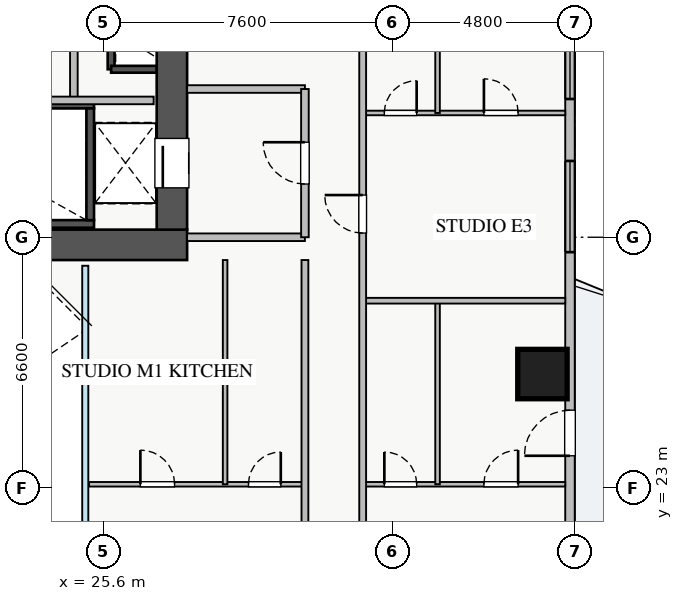
"""IFC4 building model, lengths in metres.
Left out: names, types, materials, properties, quantities, classifications, styles, units other than length and angle.
Written with IfcOpenShell. Run it as: python <this file> out.ifc"""

import sys

from ifc_helpers import new_model, si_unit, direction, frame, frame_2d, origin, origin_2d, place, context, subcontext, project, spatial, rectangle, extrude, source, transform, mapped, element, fill, save


model = new_model("IFC4")
c1 = context("Model", 3, precision=1e-05, world=origin(), true_north=direction((0.0, 1.0)))
c2 = subcontext(c1, "Body", "Model", "MODEL_VIEW")
j1 = project(units=[si_unit("LENGTHUNIT", "METRE"), si_unit("PLANEANGLEUNIT", "RADIAN")], contexts=[c1])
p1 = place(None, origin())
s1 = spatial("IfcSite", under=j1, at=p1, CompositionType="ELEMENT")
p2 = place(p1, origin())
s2 = spatial("IfcBuilding", under=s1, at=p2, CompositionType="ELEMENT")
p3 = place(p2, frame((0.0, 0.0, 32.75)))
s3 = spatial("IfcBuildingStorey", under=s2, at=p3, CompositionType="ELEMENT", Elevation=32.75)
p4 = place(p3, frame((25.8, 34.02, 0.0), z_axis=(0.0, 0.0, 1.0), x_axis=(0.0, 1.0, 0.0)))
e1 = element("IfcWall", 1, at=p4, inside=s3, PredefinedType="SHEAR", context=c2, shape_type="SweptSolid", body=[
    extrude(rectangle(XDim=1.06, YDim=0.18, at=frame_2d((0.53, 0.0))), origin(), (0.0, 0.0, 1.0), 3.07),
])
p5 = place(p3, frame((25.8, 34.02, 0.0), z_axis=(0.0, 0.0, 1.0), x_axis=(1.0, 0.0, 0.0)))
e2 = element("IfcWall", 2, at=p5, inside=s3, PredefinedType="SHEAR", context=c2, shape_type="SweptSolid", body=[
    extrude(rectangle(XDim=1.2, YDim=0.18, at=frame_2d((0.6, 0.0))), origin(), (0.0, 0.0, 1.0), 3.07),
])
p6 = place(p3, frame((18.2, 29.95, 0.0), z_axis=(0.0, 0.0, 1.0), x_axis=(1.0, 0.0, 0.0)))
e3 = element("IfcWall", 3, at=p6, inside=s3, PredefinedType="SHEAR", context=c2, shape_type="SweptSolid", body=[
    extrude(rectangle(XDim=7.15, YDim=0.2, at=frame_2d((3.575, 0.0))), origin(), (0.0, 0.0, 1.0), 3.25),
])
p7 = place(p3, frame((18.2, 33.09, 0.0), z_axis=(0.0, 0.0, 1.0), x_axis=(1.0, 0.0, 0.0)))
e4 = element("IfcWall", 4, at=p7, inside=s3, PredefinedType="SHEAR", context=c2, shape_type="SweptSolid", body=[
    extrude(rectangle(XDim=7.15, YDim=0.2, at=frame_2d((3.575, 0.0))), origin(), (0.0, 0.0, 1.0), 3.25),
])
p8 = place(p7, frame((0.35, 0.0, 0.0)))
e5 = element("IfcOpeningElement", 5, at=p8, cuts=e4, PredefinedType="OPENING", context=c2, shape_type="SweptSolid", body=[
    extrude(rectangle(XDim=1.1, YDim=2.05, at=frame_2d((0.55, 1.025))), frame((0.0, 0.11, 0.0), z_axis=(0.0, -1.0, 0.0), x_axis=(1.0, 0.0, 0.0)), (0.0, 0.0, 1.0), 0.22),
])
p9 = place(p3, frame((25.25, 30.05, 0.0), z_axis=(0.0, 0.0, 1.0), x_axis=(0.0, 1.0, 0.0)))
e6 = element("IfcWall", 6, at=p9, inside=s3, PredefinedType="SHEAR", context=c2, shape_type="SweptSolid", body=[
    extrude(rectangle(XDim=2.94, YDim=0.2, at=frame_2d((1.47, 0.0))), origin(), (0.0, 0.0, 1.0), 3.25),
])
p10 = place(p3, frame((10.2, 29.4, 0.0), z_axis=(0.0, 0.0, 1.0), x_axis=(1.0, 0.0, 0.0)))
e7 = element("IfcWall", 7, at=p10, inside=s3, PredefinedType="SHEAR", context=c2, shape_type="SweptSolid", body=[
    extrude(rectangle(XDim=17.6, YDim=0.8, at=frame_2d((8.8, 0.0))), origin(), (0.0, 0.0, 1.0), 3.25),
])
p11 = place(p3, frame((27.4, 29.8, 0.0), z_axis=(0.0, 0.0, 1.0), x_axis=(0.0, 1.0, 0.0)))
e8 = element("IfcWall", 8, at=p11, inside=s3, PredefinedType="SHEAR", context=c2, shape_type="SweptSolid", body=[
    extrude(rectangle(XDim=5.6, YDim=0.8, at=frame_2d((2.8, 0.0))), origin(), (0.0, 0.0, 1.0), 3.25),
])
p12 = place(p11, frame((1.1, 0.0, 0.0)))
e9 = element("IfcOpeningElement", 9, at=p12, cuts=e8, PredefinedType="OPENING", context=c2, shape_type="SweptSolid", body=[
    extrude(rectangle(XDim=1.3, YDim=2.05, at=frame_2d((0.65, 1.025))), frame((0.0, 0.41, 0.0), z_axis=(0.0, -1.0, 0.0), x_axis=(1.0, 0.0, 0.0)), (0.0, 0.0, 1.0), 0.82),
])
m1 = source(origin(), c2, "Body", "SweptSolid", [
    extrude(rectangle(XDim=1.3, YDim=1.3, at=origin_2d()), origin(), (0.0, 0.0, 1.0), 3.25),
])
p13 = place(p3, frame((37.15, 26.0, 0.0), z_axis=(0.0, 0.0, 1.0), x_axis=(1.0, 0.0, 0.0)))
e10 = element("IfcColumn", 10, at=p13, inside=s3, PredefinedType="COLUMN", context=c2, shape_type="MappedRepresentation", body=[
    mapped(m1, transform((0.0, 0.0, 0.0), x_axis=(1.0, 0.0, 0.0), y_axis=(0.0, 1.0, 0.0), z_axis=(0.0, 0.0, 1.0), scale=1.0)),
])
p14 = place(p3, frame((37.875, 9.45, 0.0), z_axis=(0.0, 0.0, 1.0), x_axis=(0.0, 1.0, 0.0)))
e11 = element("IfcWall", 11, at=p14, inside=s3, PredefinedType="STANDARD", context=c2, shape_type="SweptSolid", body=[
    extrude(rectangle(XDim=27.1, YDim=0.25, at=frame_2d((13.55, 0.0))), origin(), (0.0, 0.0, 1.0), 2.61),
])
p15 = place(p14, frame((14.4, 0.0, 0.0)))
e12 = element("IfcOpeningElement", 12, at=p15, cuts=e11, PredefinedType="OPENING", context=c2, shape_type="SweptSolid", body=[
    extrude(rectangle(XDim=1.2, YDim=2.1, at=frame_2d((0.6, 1.05))), frame((0.0, 0.135, 0.0), z_axis=(0.0, -1.0, 0.0), x_axis=(1.0, 0.0, 0.0)), (0.0, 0.0, 1.0), 0.27),
])
p16 = place(p14, frame((1.552, 0.0, 0.9)))
e13 = element("IfcOpeningElement", 13, at=p16, cuts=e11, PredefinedType="OPENING", context=c2, shape_type="SweptSolid", body=[
    extrude(rectangle(XDim=2.4, YDim=1.5, at=frame_2d((1.2, 0.75))), frame((0.0, 0.135, 0.0), z_axis=(0.0, -1.0, 0.0), x_axis=(1.0, 0.0, 0.0)), (0.0, 0.0, 1.0), 0.27),
])
p17 = place(p14, frame((23.788, 0.0, 0.9)))
e14 = element("IfcOpeningElement", 14, at=p17, cuts=e11, PredefinedType="OPENING", context=c2, shape_type="SweptSolid", body=[
    extrude(rectangle(XDim=1.8, YDim=1.5, at=frame_2d((0.9, 0.75))), frame((0.0, 0.135, 0.0), z_axis=(0.0, -1.0, 0.0), x_axis=(1.0, 0.0, 0.0)), (0.0, 0.0, 1.0), 0.27),
])
p18 = place(p14, frame((19.758, 0.0, 0.9)))
e15 = element("IfcOpeningElement", 15, at=p18, cuts=e11, PredefinedType="OPENING", context=c2, shape_type="SweptSolid", body=[
    extrude(rectangle(XDim=2.4, YDim=1.5, at=frame_2d((1.2, 0.75))), frame((0.0, 0.135, 0.0), z_axis=(0.0, -1.0, 0.0), x_axis=(1.0, 0.0, 0.0)), (0.0, 0.0, 1.0), 0.27),
])
p19 = place(p14, frame((8.755, 0.0, 0.9)))
e16 = element("IfcOpeningElement", 16, at=p19, cuts=e11, PredefinedType="OPENING", context=c2, shape_type="SweptSolid", body=[
    extrude(rectangle(XDim=0.9, YDim=1.2, at=frame_2d((0.45, 0.6))), frame((0.0, 0.135, 0.0), z_axis=(0.0, -1.0, 0.0), x_axis=(1.0, 0.0, 0.0)), (0.0, 0.0, 1.0), 0.27),
])
for number, where, z_axis, x_axis in (
    (17, (27.8, 29.6, 0.0), (0.0, 0.0, 1.0), (1.0, 0.0, 0.0)),
    (18, (27.8, 33.5, 0.0), (0.0, 0.0, 1.0), (1.0, 0.0, 0.0)),
):
    element("IfcWall", number, at=place(p3, frame(where, z_axis=z_axis, x_axis=x_axis)), inside=s3, PredefinedType="PARTITIONING", context=c2, shape_type="SweptSolid", body=[
        extrude(rectangle(XDim=3.1, YDim=0.2, at=frame_2d((1.55, 0.0))), origin(), (0.0, 0.0, 1.0), 3.07),
    ])
p20 = place(p3, frame((30.9, 29.6, 0.0), z_axis=(0.0, 0.0, 1.0), x_axis=(0.0, 1.0, 0.0)))
e19 = element("IfcWall", 19, at=p20, inside=s3, PredefinedType="PARTITIONING", context=c2, shape_type="SweptSolid", body=[
    extrude(rectangle(XDim=3.9, YDim=0.2, at=frame_2d((1.95, 0.0))), origin(), (0.0, 0.0, 1.0), 3.07),
])
p21 = place(p20, frame((1.4, 0.0, 0.0)))
e20 = element("IfcOpeningElement", 20, at=p21, cuts=e19, PredefinedType="OPENING", context=c2, shape_type="SweptSolid", body=[
    extrude(rectangle(XDim=1.1, YDim=2.05, at=frame_2d((0.55, 1.025))), frame((0.0, 0.11, 0.0), z_axis=(0.0, -1.0, 0.0), x_axis=(1.0, 0.0, 0.0)), (0.0, 0.0, 1.0), 0.22),
])
p22 = place(p3, frame((24.82, 33.2, 0.0), z_axis=(0.0, 0.0, 1.0), x_axis=(0.0, 1.0, 0.0)))
e21 = element("IfcWall", 21, at=p22, inside=s3, PredefinedType="PARTITIONING", context=c2, shape_type="SweptSolid", body=[
    extrude(rectangle(XDim=2.65, YDim=0.2, at=frame_2d((1.325, 0.0))), origin(), (0.0, 0.0, 1.0), 3.07),
])
p23 = place(p3, frame((21.75, 33.2, 0.0), z_axis=(0.0, 0.0, 1.0), x_axis=(1.0, 0.0, 0.0)))
e22 = element("IfcWall", 22, at=p23, inside=s3, PredefinedType="PARTITIONING", context=c2, shape_type="SweptSolid", body=[
    extrude(rectangle(XDim=5.17, YDim=0.2, at=frame_2d((2.585, 0.0))), origin(), (0.0, 0.0, 1.0), 3.07),
])
p24 = place(p3, frame((32.42, 23.1, 0.0), z_axis=(0.0, 0.0, 1.0), x_axis=(1.0, 0.0, 0.0)))
e23 = element("IfcWall", 23, at=p24, inside=s3, PredefinedType="PLUMBINGWALL", context=c2, shape_type="SweptSolid", body=[
    extrude(rectangle(XDim=5.33, YDim=0.12, at=frame_2d((2.665, 0.0))), origin(), (0.0, 0.0, 1.0), 3.07),
])
p25 = place(p24, frame((0.57, 0.0, 0.0)))
e24 = element("IfcOpeningElement", 24, at=p25, cuts=e23, PredefinedType="OPENING", context=c2, shape_type="SweptSolid", body=[
    extrude(rectangle(XDim=0.85, YDim=2.05, at=frame_2d((0.425, 1.025))), frame((0.0, 0.07, 0.0), z_axis=(0.0, -1.0, 0.0), x_axis=(1.0, 0.0, 0.0)), (0.0, 0.0, 1.0), 0.14),
])
p26 = place(p24, frame((3.19, 0.0, 0.0)))
e25 = element("IfcOpeningElement", 25, at=p26, cuts=e23, PredefinedType="OPENING", context=c2, shape_type="SweptSolid", body=[
    extrude(rectangle(XDim=0.9, YDim=2.05, at=frame_2d((0.45, 1.025))), frame((0.0, 0.07, 0.0), z_axis=(0.0, -1.0, 0.0), x_axis=(1.0, 0.0, 0.0)), (0.0, 0.0, 1.0), 0.14),
])
p27 = place(p3, frame((34.39, 23.1, 0.0), z_axis=(0.0, 0.0, 1.0), x_axis=(0.0, 1.0, 0.0)))
e26 = element("IfcWall", 26, at=p27, inside=s3, PredefinedType="PLUMBINGWALL", context=c2, shape_type="SweptSolid", body=[
    extrude(rectangle(XDim=4.83, YDim=0.12, at=frame_2d((2.415, 0.0))), origin(), (0.0, 0.0, 1.0), 3.07),
])
p28 = place(p3, frame((32.42, 32.87, 0.0), z_axis=(0.0, 0.0, 1.0), x_axis=(1.0, 0.0, 0.0)))
e27 = element("IfcWall", 27, at=p28, inside=s3, PredefinedType="PLUMBINGWALL", context=c2, shape_type="SweptSolid", body=[
    extrude(rectangle(XDim=5.33, YDim=0.12, at=frame_2d((2.665, 0.0))), origin(), (0.0, 0.0, 1.0), 3.07),
])
p29 = place(p28, frame((0.57, 0.0, 0.0)))
e28 = element("IfcOpeningElement", 28, at=p29, cuts=e27, PredefinedType="OPENING", context=c2, shape_type="SweptSolid", body=[
    extrude(rectangle(XDim=0.85, YDim=2.05, at=frame_2d((0.425, 1.025))), frame((0.0, 0.07, 0.0), z_axis=(0.0, -1.0, 0.0), x_axis=(1.0, 0.0, 0.0)), (0.0, 0.0, 1.0), 0.14),
])
p30 = place(p28, frame((3.19, 0.0, 0.0)))
e29 = element("IfcOpeningElement", 29, at=p30, cuts=e27, PredefinedType="OPENING", context=c2, shape_type="SweptSolid", body=[
    extrude(rectangle(XDim=0.9, YDim=2.05, at=frame_2d((0.45, 1.025))), frame((0.0, 0.07, 0.0), z_axis=(0.0, -1.0, 0.0), x_axis=(1.0, 0.0, 0.0)), (0.0, 0.0, 1.0), 0.14),
])
p31 = place(p3, frame((34.39, 32.87, 0.0), z_axis=(0.0, 0.0, 1.0), x_axis=(0.0, 1.0, 0.0)))
e30 = element("IfcWall", 30, at=p31, inside=s3, PredefinedType="PLUMBINGWALL", context=c2, shape_type="SweptSolid", body=[
    extrude(rectangle(XDim=4.21, YDim=0.12, at=frame_2d((2.105, 0.0))), origin(), (0.0, 0.0, 1.0), 3.07),
])
p32 = place(p3, frame((32.42, 27.93, 0.0), z_axis=(0.0, 0.0, 1.0), x_axis=(1.0, 0.0, 0.0)))
e31 = element("IfcWall", 31, at=p32, inside=s3, PredefinedType="PARTITIONING", context=c2, shape_type="SweptSolid", body=[
    extrude(rectangle(XDim=5.33, YDim=0.15, at=frame_2d((2.665, 0.0))), origin(), (0.0, 0.0, 1.0), 2.865),
])
p33 = place(p3, frame((32.42, 7.21, 0.0), z_axis=(0.0, 0.0, 1.0), x_axis=(0.0, 1.0, 0.0)))
e32 = element("IfcWall", 32, at=p33, inside=s3, PredefinedType="PARTITIONING", context=c2, shape_type="SweptSolid", body=[
    extrude(rectangle(XDim=31.23, YDim=0.18, at=frame_2d((15.615, 0.0))), origin(), (0.0, 0.0, 1.0), 2.771),
])
p34 = place(p33, frame((30.09, 0.0, 0.0)))
e33 = element("IfcOpeningElement", 33, at=p34, cuts=e32, PredefinedType="OPENING", context=c2, shape_type="SweptSolid", body=[
    extrude(rectangle(XDim=0.9, YDim=2.05, at=frame_2d((0.45, 1.025))), frame((0.0, 0.1, 0.0), z_axis=(0.0, -1.0, 0.0), x_axis=(1.0, 0.0, 0.0)), (0.0, 0.0, 1.0), 0.2),
])
p35 = place(p33, frame((0.415, 0.0, 0.0)))
e34 = element("IfcOpeningElement", 34, at=p35, cuts=e32, PredefinedType="OPENING", context=c2, shape_type="SweptSolid", body=[
    extrude(rectangle(XDim=0.9, YDim=2.05, at=frame_2d((0.45, 1.025))), frame((0.0, 0.1, 0.0), z_axis=(0.0, -1.0, 0.0), x_axis=(1.0, 0.0, 0.0)), (0.0, 0.0, 1.0), 0.2),
])
p36 = place(p33, frame((3.465, 0.0, 0.0)))
e35 = element("IfcOpeningElement", 35, at=p36, cuts=e32, PredefinedType="OPENING", context=c2, shape_type="SweptSolid", body=[
    extrude(rectangle(XDim=1.0, YDim=2.05, at=frame_2d((0.5, 1.025))), frame((0.0, 0.1, 0.0), z_axis=(0.0, -1.0, 0.0), x_axis=(1.0, 0.0, 0.0)), (0.0, 0.0, 1.0), 0.2),
])
p37 = place(p33, frame((12.635, 0.0, 0.0)))
e36 = element("IfcOpeningElement", 36, at=p37, cuts=e32, PredefinedType="OPENING", context=c2, shape_type="SweptSolid", body=[
    extrude(rectangle(XDim=1.0, YDim=2.05, at=frame_2d((0.5, 1.025))), frame((0.0, 0.1, 0.0), z_axis=(0.0, -1.0, 0.0), x_axis=(1.0, 0.0, 0.0)), (0.0, 0.0, 1.0), 0.2),
])
p38 = place(p33, frame((22.5, 0.0, 0.0)))
e37 = element("IfcOpeningElement", 37, at=p38, cuts=e32, PredefinedType="OPENING", context=c2, shape_type="SweptSolid", body=[
    extrude(rectangle(XDim=1.0, YDim=2.05, at=frame_2d((0.5, 1.025))), frame((0.0, 0.1, 0.0), z_axis=(0.0, -1.0, 0.0), x_axis=(1.0, 0.0, 0.0)), (0.0, 0.0, 1.0), 0.2),
])
p39 = place(p3, frame((25.22, 23.1, 0.0), z_axis=(0.0, 0.0, 1.0), x_axis=(1.0, 0.0, 0.0)))
e38 = element("IfcWall", 38, at=p39, inside=s3, PredefinedType="PLUMBINGWALL", context=c2, shape_type="SweptSolid", body=[
    extrude(rectangle(XDim=5.68, YDim=0.12, at=frame_2d((2.84, 0.0))), origin(), (0.0, 0.0, 1.0), 3.07),
])
p40 = place(p39, frame((1.35, 0.0, 0.0)))
e39 = element("IfcOpeningElement", 39, at=p40, cuts=e38, PredefinedType="OPENING", context=c2, shape_type="SweptSolid", body=[
    extrude(rectangle(XDim=0.9, YDim=2.05, at=frame_2d((0.45, 1.025))), frame((0.0, 0.07, 0.0), z_axis=(0.0, -1.0, 0.0), x_axis=(1.0, 0.0, 0.0)), (0.0, 0.0, 1.0), 0.14),
])
p41 = place(p39, frame((4.195, 0.0, 0.0)))
e40 = element("IfcOpeningElement", 40, at=p41, cuts=e38, PredefinedType="OPENING", context=c2, shape_type="SweptSolid", body=[
    extrude(rectangle(XDim=0.85, YDim=2.05, at=frame_2d((0.425, 1.025))), frame((0.0, 0.07, 0.0), z_axis=(0.0, -1.0, 0.0), x_axis=(1.0, 0.0, 0.0)), (0.0, 0.0, 1.0), 0.14),
])
p42 = place(p3, frame((28.8, 23.1, 0.0), z_axis=(0.0, 0.0, 1.0), x_axis=(0.0, 1.0, 0.0)))
e41 = element("IfcWall", 41, at=p42, inside=s3, PredefinedType="PLUMBINGWALL", context=c2, shape_type="SweptSolid", body=[
    extrude(rectangle(XDim=5.9, YDim=0.12, at=frame_2d((2.95, 0.0))), origin(), (0.0, 0.0, 1.0), 3.07),
])
p43 = place(p3, frame((30.9, 17.0, 0.0), z_axis=(0.0, 0.0, 1.0), x_axis=(0.0, 1.0, 0.0)))
e42 = element("IfcWall", 42, at=p43, inside=s3, PredefinedType="PARTITIONING", context=c2, shape_type="SweptSolid", body=[
    extrude(rectangle(XDim=12.0, YDim=0.18, at=frame_2d((6.0, 0.0))), origin(), (0.0, 0.0, 1.0), 3.07),
])
p44 = place(p43, frame((2.36, 0.0, 0.0)))
e43 = element("IfcOpeningElement", 43, at=p44, cuts=e42, PredefinedType="OPENING", context=c2, shape_type="SweptSolid", body=[
    extrude(rectangle(XDim=1.0, YDim=2.05, at=frame_2d((0.5, 1.025))), frame((0.0, 0.1, 0.0), z_axis=(0.0, -1.0, 0.0), x_axis=(1.0, 0.0, 0.0)), (0.0, 0.0, 1.0), 0.2),
])
m2 = source(origin(), c2, "Body", "SweptSolid", [
    extrude(rectangle(XDim=1.2, YDim=2.1, at=frame_2d((0.6, 1.05))), frame((0.0, 0.025, 0.0), z_axis=(0.0, -1.0, 0.0), x_axis=(1.0, 0.0, 0.0)), (0.0, 0.0, 1.0), 0.05),
])
p45 = place(p15, origin())
e44 = element("IfcDoor", 44, at=p45, inside=s3, OperationType="SINGLE_SWING_LEFT", PredefinedType="DOOR", context=c2, shape_type="MappedRepresentation", body=[
    mapped(m2, transform((0.0, 0.0, 0.0), x_axis=(1.0, 0.0, 0.0), y_axis=(0.0, 1.0, 0.0), z_axis=(0.0, 0.0, 1.0), scale=1.0)),
])
fill(e12, e44)
m3 = source(origin(), c2, "Body", "SweptSolid", [
    extrude(rectangle(XDim=1.8, YDim=1.5, at=frame_2d((0.9, 0.75))), frame((0.0, 0.03, 0.0), z_axis=(0.0, -1.0, 0.0), x_axis=(1.0, 0.0, 0.0)), (0.0, 0.0, 1.0), 0.06),
])
p46 = place(p17, origin())
e45 = element("IfcWindow", 45, at=p46, inside=s3, PartitioningType="TRIPLE_PANEL_VERTICAL", PredefinedType="WINDOW", context=c2, shape_type="MappedRepresentation", body=[
    mapped(m3, transform((0.0, 0.0, 0.0), x_axis=(1.0, 0.0, 0.0), y_axis=(0.0, 1.0, 0.0), z_axis=(0.0, 0.0, 1.0), scale=1.0)),
])
fill(e14, e45)
m4 = source(origin(), c2, "Body", "SweptSolid", [
    extrude(rectangle(XDim=1.3, YDim=2.05, at=frame_2d((0.65, 1.025))), frame((0.0, 0.025, 0.0), z_axis=(0.0, -1.0, 0.0), x_axis=(1.0, 0.0, 0.0)), (0.0, 0.0, 1.0), 0.05),
])
p47 = place(p12, origin())
e46 = element("IfcDoor", 46, at=p47, inside=s3, OperationType="SLIDING_TO_LEFT", PredefinedType="DOOR", context=c2, shape_type="MappedRepresentation", body=[
    mapped(m4, transform((0.0, 0.0, 0.0), x_axis=(1.0, 0.0, 0.0), y_axis=(0.0, 1.0, 0.0), z_axis=(0.0, 0.0, 1.0), scale=1.0)),
])
fill(e9, e46)
m5 = source(origin(), c2, "Body", "SweptSolid", [
    extrude(rectangle(XDim=1.1, YDim=2.05, at=frame_2d((0.55, 1.025))), frame((0.0, 0.025, 0.0), z_axis=(0.0, -1.0, 0.0), x_axis=(1.0, 0.0, 0.0)), (0.0, 0.0, 1.0), 0.05),
])
p48 = place(p21, origin())
e47 = element("IfcDoor", 47, at=p48, inside=s3, OperationType="SINGLE_SWING_RIGHT", PredefinedType="DOOR", context=c2, shape_type="MappedRepresentation", body=[
    mapped(m5, transform((0.0, 0.0, 0.0), x_axis=(1.0, 0.0, 0.0), y_axis=(0.0, 1.0, 0.0), z_axis=(0.0, 0.0, 1.0), scale=1.0)),
])
fill(e20, e47)
m6 = source(origin(), c2, "Body", "SweptSolid", [
    extrude(rectangle(XDim=0.85, YDim=2.05, at=frame_2d((0.425, 1.025))), frame((0.0, 0.025, 0.0), z_axis=(0.0, -1.0, 0.0), x_axis=(1.0, 0.0, 0.0)), (0.0, 0.0, 1.0), 0.05),
])
p49 = place(p25, origin())
e48 = element("IfcDoor", 48, at=p49, inside=s3, OperationType="SINGLE_SWING_LEFT", PredefinedType="DOOR", context=c2, shape_type="MappedRepresentation", body=[
    mapped(m6, transform((0.0, 0.0, 0.0), x_axis=(1.0, 0.0, 0.0), y_axis=(0.0, 1.0, 0.0), z_axis=(0.0, 0.0, 1.0), scale=1.0)),
])
fill(e24, e48)
m7 = source(origin(), c2, "Body", "SweptSolid", [
    extrude(rectangle(XDim=0.9, YDim=2.05, at=frame_2d((0.45, 1.025))), frame((0.0, 0.025, 0.0), z_axis=(0.0, -1.0, 0.0), x_axis=(1.0, 0.0, 0.0)), (0.0, 0.0, 1.0), 0.05),
])
p50 = place(p26, origin())
e49 = element("IfcDoor", 49, at=p50, inside=s3, OperationType="SINGLE_SWING_RIGHT", PredefinedType="DOOR", context=c2, shape_type="MappedRepresentation", body=[
    mapped(m7, transform((0.0, 0.0, 0.0), x_axis=(1.0, 0.0, 0.0), y_axis=(0.0, 1.0, 0.0), z_axis=(0.0, 0.0, 1.0), scale=1.0)),
])
fill(e25, e49)
p51 = place(p29, origin())
e50 = element("IfcDoor", 50, at=p51, inside=s3, OperationType="SINGLE_SWING_RIGHT", PredefinedType="DOOR", context=c2, shape_type="MappedRepresentation", body=[
    mapped(m6, transform((0.0, 0.0, 0.0), x_axis=(1.0, 0.0, 0.0), y_axis=(0.0, 1.0, 0.0), z_axis=(0.0, 0.0, 1.0), scale=1.0)),
])
fill(e28, e50)
p52 = place(p30, origin())
e51 = element("IfcDoor", 51, at=p52, inside=s3, OperationType="SINGLE_SWING_LEFT", PredefinedType="DOOR", context=c2, shape_type="MappedRepresentation", body=[
    mapped(m7, transform((0.0, 0.0, 0.0), x_axis=(1.0, 0.0, 0.0), y_axis=(0.0, 1.0, 0.0), z_axis=(0.0, 0.0, 1.0), scale=1.0)),
])
fill(e29, e51)
m8 = source(origin(), c2, "Body", "SweptSolid", [
    extrude(rectangle(XDim=1.0, YDim=2.05, at=frame_2d((0.5, 1.025))), frame((0.0, 0.025, 0.0), z_axis=(0.0, -1.0, 0.0), x_axis=(1.0, 0.0, 0.0)), (0.0, 0.0, 1.0), 0.05),
])
p53 = place(p38, origin())
e52 = element("IfcDoor", 52, at=p53, inside=s3, OperationType="SINGLE_SWING_RIGHT", PredefinedType="DOOR", context=c2, shape_type="MappedRepresentation", body=[
    mapped(m8, transform((0.0, 0.0, 0.0), x_axis=(1.0, 0.0, 0.0), y_axis=(0.0, 1.0, 0.0), z_axis=(0.0, 0.0, 1.0), scale=1.0)),
])
fill(e37, e52)
p54 = place(p40, origin())
e53 = element("IfcDoor", 53, at=p54, inside=s3, OperationType="SINGLE_SWING_LEFT", PredefinedType="DOOR", context=c2, shape_type="MappedRepresentation", body=[
    mapped(m7, transform((0.0, 0.0, 0.0), x_axis=(1.0, 0.0, 0.0), y_axis=(0.0, 1.0, 0.0), z_axis=(0.0, 0.0, 1.0), scale=1.0)),
])
fill(e39, e53)
p55 = place(p41, origin())
e54 = element("IfcDoor", 54, at=p55, inside=s3, OperationType="SINGLE_SWING_RIGHT", PredefinedType="DOOR", context=c2, shape_type="MappedRepresentation", body=[
    mapped(m6, transform((0.0, 0.0, 0.0), x_axis=(1.0, 0.0, 0.0), y_axis=(0.0, 1.0, 0.0), z_axis=(0.0, 0.0, 1.0), scale=1.0)),
])
fill(e40, e54)
m9 = source(origin(), c2, "Body", "SweptSolid", [
    extrude(rectangle(XDim=2.4, YDim=1.5, at=frame_2d((1.2, 0.75))), frame((0.0, 0.03, 0.0), z_axis=(0.0, -1.0, 0.0), x_axis=(1.0, 0.0, 0.0)), (0.0, 0.0, 1.0), 0.06),
])
p56 = place(p18, origin())
e55 = element("IfcWindow", 55, at=p56, inside=s3, PartitioningType="TRIPLE_PANEL_VERTICAL", PredefinedType="WINDOW", context=c2, shape_type="MappedRepresentation", body=[
    mapped(m9, transform((0.0, 0.0, 0.0), x_axis=(1.0, 0.0, 0.0), y_axis=(0.0, 1.0, 0.0), z_axis=(0.0, 0.0, 1.0), scale=1.0)),
])
fill(e15, e55)
save(model, sys.argv[1])
